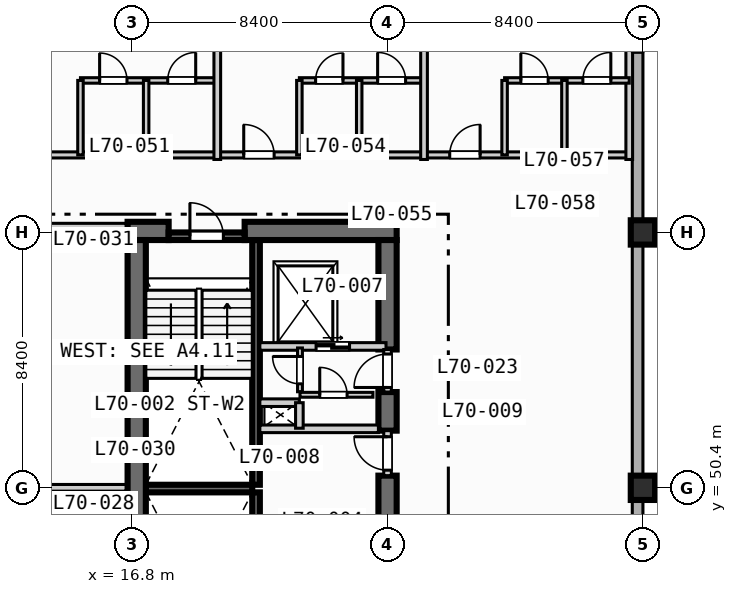
"""IFC4 building model, lengths in metres.
Left out: names, types, materials, properties, quantities, classifications, styles, units other than length and angle.
Written with IfcOpenShell. Run it as: python <this file> out.ifc"""

import sys

from ifc_helpers import new_model, si_unit, direction, frame, frame_2d, origin, origin_2d, place, context, subcontext, project, spatial, rectangle, extrude, element, fill, save


model = new_model("IFC4")
c1 = context("Model", 3, precision=1e-05, world=origin(), true_north=direction((0.0, 1.0)))
c2 = subcontext(c1, "Body", "Model", "MODEL_VIEW")
j1 = project(units=[si_unit("LENGTHUNIT", "METRE"), si_unit("PLANEANGLEUNIT", "RADIAN")], contexts=[c1])
p1 = place(None, origin())
s1 = spatial("IfcSite", under=j1, at=p1, CompositionType="ELEMENT")
p2 = place(p1, origin())
s2 = spatial("IfcBuilding", under=s1, at=p2, CompositionType="ELEMENT")
p3 = place(p2, frame((0.0, 0.0, 282.3)))
s3 = spatial("IfcBuildingStorey", under=s2, at=p3, CompositionType="ELEMENT", Elevation=282.3)
for number, where, z_axis, x_axis in (
    (1, (20.875, 42.2, 0.0), (0.0, 0.0, 1.0), (0.0, 1.0, 0.0)),
    (2, (20.875, 50.5, 0.0), (0.0, 0.0, 1.0), (0.0, 1.0, 0.0)),
):
    element("IfcWall", number, at=place(p3, frame(where, z_axis=z_axis, x_axis=x_axis)), inside=s3, PredefinedType="SOLIDWALL", context=c2, shape_type="SweptSolid", body=[
        extrude(rectangle(XDim=8.05, YDim=0.25, at=frame_2d((4.025, 0.0))), origin(), (0.0, 0.0, 1.0), 3.47),
    ])
p4 = place(p3, frame((17.25, 50.375, 0.0), z_axis=(0.0, 0.0, 1.0), x_axis=(1.0, 0.0, 0.0)))
e3 = element("IfcWall", 3, at=p4, inside=s3, PredefinedType="SOLIDWALL", context=c2, shape_type="SweptSolid", body=[
    extrude(rectangle(XDim=3.5, YDim=0.25, at=frame_2d((1.75, 0.0))), origin(), (0.0, 0.0, 1.0), 3.47),
])
p5 = place(p3, frame((16.65, 58.85, 0.0), z_axis=(0.0, 0.0, 1.0), x_axis=(1.0, 0.0, 0.0)))
e4 = element("IfcWall", 4, at=p5, inside=s3, PredefinedType="SHEAR", context=c2, shape_type="SweptSolid", body=[
    extrude(rectangle(XDim=1.35, YDim=0.6, at=frame_2d((0.675, 0.0))), origin(), (0.0, 0.0, 1.0), 3.47),
])
p6 = place(p3, frame((20.5, 58.85, 0.0), z_axis=(0.0, 0.0, 1.0), x_axis=(1.0, 0.0, 0.0)))
e5 = element("IfcWall", 5, at=p6, inside=s3, PredefinedType="SHEAR", context=c2, shape_type="SweptSolid", body=[
    extrude(rectangle(XDim=5.0, YDim=0.6, at=frame_2d((2.5, 0.0))), origin(), (0.0, 0.0, 1.0), 3.47),
])
p7 = place(p3, frame((16.95, 42.2, 0.0), z_axis=(0.0, 0.0, 1.0), x_axis=(0.0, 1.0, 0.0)))
e6 = element("IfcWall", 6, at=p7, inside=s3, PredefinedType="SHEAR", context=c2, shape_type="SweptSolid", body=[
    extrude(rectangle(XDim=16.35, YDim=0.6, at=frame_2d((8.175, 0.0))), origin(), (0.0, 0.0, 1.0), 3.47),
])
p8 = place(p3, frame((25.2, 42.2, 0.0), z_axis=(0.0, 0.0, 1.0), x_axis=(0.0, 1.0, 0.0)))
e7 = element("IfcWall", 7, at=p8, inside=s3, PredefinedType="SHEAR", context=c2, shape_type="SweptSolid", body=[
    extrude(rectangle(XDim=8.6, YDim=0.6, at=frame_2d((4.3, 0.0))), origin(), (0.0, 0.0, 1.0), 3.47),
])
p9 = place(p3, frame((25.2, 52.28, 0.0), z_axis=(0.0, 0.0, 1.0), x_axis=(0.0, 1.0, 0.0)))
e8 = element("IfcWall", 8, at=p9, inside=s3, PredefinedType="SHEAR", context=c2, shape_type="SweptSolid", body=[
    extrude(rectangle(XDim=1.27, YDim=0.6, at=frame_2d((0.635, 0.0))), origin(), (0.0, 0.0, 1.0), 3.47),
])
p10 = place(p3, frame((25.2, 54.95, 0.0), z_axis=(0.0, 0.0, 1.0), x_axis=(0.0, 1.0, 0.0)))
e9 = element("IfcWall", 9, at=p10, inside=s3, PredefinedType="SHEAR", context=c2, shape_type="SweptSolid", body=[
    extrude(rectangle(XDim=3.6, YDim=0.6, at=frame_2d((1.8, 0.0))), origin(), (0.0, 0.0, 1.0), 3.47),
])
for number, where, z_axis, x_axis in (
    (10, (33.6, 50.4, 0.0), (0.0, 0.0, 1.0), (1.0, 0.0, 0.0)),
    (11, (33.6, 58.8, 0.0), (0.0, 0.0, 1.0), (1.0, 0.0, 0.0)),
):
    element("IfcColumn", number, at=place(p3, frame(where, z_axis=z_axis, x_axis=x_axis)), inside=s3, PredefinedType="COLUMN", context=c2, shape_type="SweptSolid", body=[
        extrude(rectangle(XDim=0.8, YDim=0.8, at=origin_2d()), origin(), (0.0, 0.0, 1.0), 3.7),
    ])
p11 = place(p3, frame((33.425, 72.425, 0.0), z_axis=(0.0, 0.0, 1.0), x_axis=(0.0, -1.0, 0.0)))
e12 = element("IfcWall", 12, at=p11, inside=s3, PredefinedType="STANDARD", context=c2, shape_type="SweptSolid", body=[
    extrude(rectangle(XDim=39.0, YDim=0.35, at=frame_2d((19.5, 0.0))), origin(), (0.0, 0.0, 1.0), 3.47),
])
p12 = place(p11, frame((5.9, 0.0, 0.85)))
e13 = element("IfcOpeningElement", 13, at=p12, cuts=e12, PredefinedType="OPENING", context=c2, shape_type="SweptSolid", body=[
    extrude(rectangle(XDim=1.8, YDim=1.8, at=frame_2d((0.9, 0.9))), frame((0.0, 0.185, 0.0), z_axis=(0.0, -1.0, 0.0), x_axis=(1.0, 0.0, 0.0)), (0.0, 0.0, 1.0), 0.37),
])
p13 = place(p3, frame((18.0, 58.675, 0.0), z_axis=(0.0, 0.0, 1.0), x_axis=(1.0, 0.0, 0.0)))
e14 = element("IfcWall", 14, at=p13, inside=s3, PredefinedType="SOLIDWALL", context=c2, shape_type="SweptSolid", body=[
    extrude(rectangle(XDim=2.5, YDim=0.25, at=frame_2d((1.25, 0.0))), origin(), (0.0, 0.0, 1.0), 3.47),
])
p14 = place(p13, frame((0.7, 0.0, 0.0)))
e15 = element("IfcOpeningElement", 15, at=p14, cuts=e14, PredefinedType="OPENING", context=c2, shape_type="SweptSolid", body=[
    extrude(rectangle(XDim=1.1, YDim=2.15, at=frame_2d((0.55, 1.075))), frame((0.0, 0.135, 0.0), z_axis=(0.0, -1.0, 0.0), x_axis=(1.0, 0.0, 0.0)), (0.0, 0.0, 1.0), 0.27),
])
p15 = place(p3, frame((25.2, 50.8, 0.0), z_axis=(0.0, 0.0, 1.0), x_axis=(0.0, 1.0, 0.0)))
e16 = element("IfcWall", 16, at=p15, inside=s3, PredefinedType="SOLIDWALL", context=c2, shape_type="SweptSolid", body=[
    extrude(rectangle(XDim=1.48, YDim=0.25, at=frame_2d((0.74, 0.0))), origin(), (0.0, 0.0, 1.0), 3.47),
])
p16 = place(p15, frame((0.18, 0.0, 0.0)))
e17 = element("IfcOpeningElement", 17, at=p16, cuts=e16, PredefinedType="OPENING", context=c2, shape_type="SweptSolid", body=[
    extrude(rectangle(XDim=1.1, YDim=2.15, at=frame_2d((0.55, 1.075))), frame((0.0, 0.135, 0.0), z_axis=(0.0, -1.0, 0.0), x_axis=(1.0, 0.0, 0.0)), (0.0, 0.0, 1.0), 0.27),
])
p17 = place(p3, frame((21.0, 52.34, 0.0), z_axis=(0.0, 0.0, 1.0), x_axis=(1.0, 0.0, 0.0)))
e18 = element("IfcWall", 18, at=p17, inside=s3, PredefinedType="SOLIDWALL", context=c2, shape_type="SweptSolid", body=[
    extrude(rectangle(XDim=3.9, YDim=0.25, at=frame_2d((1.95, 0.0))), origin(), (0.0, 0.0, 1.0), 3.47),
])
p18 = place(p3, frame((21.0, 55.05, 0.0), z_axis=(0.0, 0.0, 1.0), x_axis=(1.0, 0.0, 0.0)))
e19 = element("IfcWall", 19, at=p18, inside=s3, PredefinedType="SOLIDWALL", context=c2, shape_type="SweptSolid", body=[
    extrude(rectangle(XDim=4.15, YDim=0.25, at=frame_2d((2.075, 0.0))), origin(), (0.0, 0.0, 1.0), 3.47),
])
p19 = place(p18, frame((1.85, 0.0, 0.0)))
e20 = element("IfcOpeningElement", 20, at=p19, cuts=e19, PredefinedType="OPENING", context=c2, shape_type="SweptSolid", body=[
    extrude(rectangle(XDim=1.1, YDim=2.15, at=frame_2d((0.55, 1.075))), frame((0.0, 0.135, 0.0), z_axis=(0.0, -1.0, 0.0), x_axis=(1.0, 0.0, 0.0)), (0.0, 0.0, 1.0), 0.27),
])
p20 = place(p3, frame((25.2, 53.55, 0.0), z_axis=(0.0, 0.0, 1.0), x_axis=(0.0, 1.0, 0.0)))
e21 = element("IfcWall", 21, at=p20, inside=s3, PredefinedType="SOLIDWALL", context=c2, shape_type="SweptSolid", body=[
    extrude(rectangle(XDim=1.4, YDim=0.25, at=frame_2d((0.7, 0.0))), origin(), (0.0, 0.0, 1.0), 3.47),
])
p21 = place(p20, frame((0.15, 0.0, 0.0)))
e22 = element("IfcOpeningElement", 22, at=p21, cuts=e21, PredefinedType="OPENING", context=c2, shape_type="SweptSolid", body=[
    extrude(rectangle(XDim=1.1, YDim=2.15, at=frame_2d((0.55, 1.075))), frame((0.0, 0.135, 0.0), z_axis=(0.0, -1.0, 0.0), x_axis=(1.0, 0.0, 0.0)), (0.0, 0.0, 1.0), 0.27),
])
p22 = place(p3, frame((21.0, 53.2, 0.0), z_axis=(0.0, 0.0, 1.0), x_axis=(1.0, 0.0, 0.0)))
e23 = element("IfcWall", 23, at=p22, inside=s3, PredefinedType="SOLIDWALL", context=c2, shape_type="SweptSolid", body=[
    extrude(rectangle(XDim=1.3, YDim=0.25, at=frame_2d((0.65, 0.0))), origin(), (0.0, 0.0, 1.0), 3.47),
])
p23 = place(p3, frame((22.3, 52.36, 0.0), z_axis=(0.0, 0.0, 1.0), x_axis=(0.0, 1.0, 0.0)))
e24 = element("IfcWall", 24, at=p23, inside=s3, PredefinedType="SOLIDWALL", context=c2, shape_type="SweptSolid", body=[
    extrude(rectangle(XDim=0.84, YDim=0.25, at=frame_2d((0.42, 0.0))), origin(), (0.0, 0.0, 1.0), 3.47),
])
p24 = place(p3, frame((22.32, 53.56, 0.0), z_axis=(0.0, 0.0, 1.0), x_axis=(0.0, 1.0, 0.0)))
e25 = element("IfcWall", 25, at=p24, inside=s3, PredefinedType="PARTITIONING", context=c2, shape_type="SweptSolid", body=[
    extrude(rectangle(XDim=1.44, YDim=0.16, at=frame_2d((0.72, 0.0))), origin(), (0.0, 0.0, 1.0), 3.47),
])
p25 = place(p24, frame((0.26, 0.0, 0.0)))
e26 = element("IfcOpeningElement", 26, at=p25, cuts=e25, PredefinedType="OPENING", context=c2, shape_type="SweptSolid", body=[
    extrude(rectangle(XDim=0.9, YDim=2.1, at=frame_2d((0.45, 1.05))), frame((0.0, 0.09, 0.0), z_axis=(0.0, -1.0, 0.0), x_axis=(1.0, 0.0, 0.0)), (0.0, 0.0, 1.0), 0.18),
])
p26 = place(p3, frame((22.32, 53.46, 0.0), z_axis=(0.0, 0.0, 1.0), x_axis=(1.0, 0.0, 0.0)))
e27 = element("IfcWall", 27, at=p26, inside=s3, PredefinedType="PARTITIONING", context=c2, shape_type="SweptSolid", body=[
    extrude(rectangle(XDim=2.4, YDim=0.16, at=frame_2d((1.2, 0.0))), origin(), (0.0, 0.0, 1.0), 3.47),
])
p27 = place(p26, frame((0.65, 0.0, 0.0)))
e28 = element("IfcOpeningElement", 28, at=p27, cuts=e27, PredefinedType="OPENING", context=c2, shape_type="SweptSolid", body=[
    extrude(rectangle(XDim=0.9, YDim=2.1, at=frame_2d((0.45, 1.05))), frame((0.0, 0.09, 0.0), z_axis=(0.0, -1.0, 0.0), x_axis=(1.0, 0.0, 0.0)), (0.0, 0.0, 1.0), 0.18),
])
p28 = place(p3, frame((8.65, 59.0, 0.0), z_axis=(0.0, 0.0, 1.0), x_axis=(1.0, 0.0, 0.0)))
e29 = element("IfcWall", 29, at=p28, inside=s3, PredefinedType="PARTITIONING", context=c2, shape_type="SweptSolid", body=[
    extrude(rectangle(XDim=7.95, YDim=0.2, at=frame_2d((3.975, 0.0))), origin(), (0.0, 0.0, 1.0), 2.87),
])
p29 = place(p28, frame((2.0, 0.0, 0.0)))
e30 = element("IfcOpeningElement", 30, at=p29, cuts=e29, PredefinedType="OPENING", context=c2, shape_type="SweptSolid", body=[
    extrude(rectangle(XDim=1.0, YDim=2.15, at=frame_2d((0.5, 1.075))), frame((0.0, 0.11, 0.0), z_axis=(0.0, -1.0, 0.0), x_axis=(1.0, 0.0, 0.0)), (0.0, 0.0, 1.0), 0.22),
])
p30 = place(p3, frame((8.65, 50.4, 0.0), z_axis=(0.0, 0.0, 1.0), x_axis=(1.0, 0.0, 0.0)))
e31 = element("IfcWall", 31, at=p30, inside=s3, PredefinedType="PARTITIONING", context=c2, shape_type="SweptSolid", body=[
    extrude(rectangle(XDim=7.95, YDim=0.22, at=frame_2d((3.975, 0.0))), origin(), (0.0, 0.0, 1.0), 3.16),
])
p31 = place(p3, frame((13.8, 54.7, 0.0), z_axis=(0.0, 0.0, 1.0), x_axis=(1.0, 0.0, 0.0)))
e32 = element("IfcWall", 32, at=p31, inside=s3, PredefinedType="PLUMBINGWALL", context=c2, shape_type="SweptSolid", body=[
    extrude(rectangle(XDim=2.8, YDim=0.18, at=frame_2d((1.4, 0.0))), origin(), (0.0, 0.0, 1.0), 3.47),
])
p32 = place(p3, frame((11.8, 61.35, 0.0), z_axis=(0.0, 0.0, 1.0), x_axis=(1.0, 0.0, 0.0)))
e33 = element("IfcWall", 33, at=p32, inside=s3, PredefinedType="PARTITIONING", context=c2, shape_type="SweptSolid", body=[
    extrude(rectangle(XDim=21.35, YDim=0.2, at=frame_2d((10.675, 0.0))), origin(), (0.0, 0.0, 1.0), 3.47),
])
p33 = place(p32, frame((1.17, 0.0, 0.0)))
e34 = element("IfcOpeningElement", 34, at=p33, cuts=e33, PredefinedType="OPENING", context=c2, shape_type="SweptSolid", body=[
    extrude(rectangle(XDim=1.0, YDim=2.15, at=frame_2d((0.5, 1.075))), frame((0.0, 0.11, 0.0), z_axis=(0.0, -1.0, 0.0), x_axis=(1.0, 0.0, 0.0)), (0.0, 0.0, 1.0), 0.22),
])
p34 = place(p32, frame((8.67, 0.0, 0.0)))
e35 = element("IfcOpeningElement", 35, at=p34, cuts=e33, PredefinedType="OPENING", context=c2, shape_type="SweptSolid", body=[
    extrude(rectangle(XDim=1.0, YDim=2.15, at=frame_2d((0.5, 1.075))), frame((0.0, 0.11, 0.0), z_axis=(0.0, -1.0, 0.0), x_axis=(1.0, 0.0, 0.0)), (0.0, 0.0, 1.0), 0.22),
])
p35 = place(p32, frame((15.445, 0.0, 0.0)))
e36 = element("IfcOpeningElement", 36, at=p35, cuts=e33, PredefinedType="OPENING", context=c2, shape_type="SweptSolid", body=[
    extrude(rectangle(XDim=1.0, YDim=2.15, at=frame_2d((0.5, 1.075))), frame((0.0, 0.11, 0.0), z_axis=(0.0, -1.0, 0.0), x_axis=(1.0, 0.0, 0.0)), (0.0, 0.0, 1.0), 0.22),
])
p36 = place(p3, frame((15.1, 63.8, 0.0), z_axis=(0.0, 0.0, 1.0), x_axis=(1.0, 0.0, 0.0)))
e37 = element("IfcWall", 37, at=p36, inside=s3, PredefinedType="PLUMBINGWALL", context=c2, shape_type="SweptSolid", body=[
    extrude(rectangle(XDim=4.5, YDim=0.18, at=frame_2d((2.25, 0.0))), origin(), (0.0, 0.0, 1.0), 3.47),
])
p37 = place(p36, frame((0.63, 0.0, 0.0)))
e38 = element("IfcOpeningElement", 38, at=p37, cuts=e37, PredefinedType="OPENING", context=c2, shape_type="SweptSolid", body=[
    extrude(rectangle(XDim=0.9, YDim=2.1, at=frame_2d((0.45, 1.05))), frame((0.0, 0.1, 0.0), z_axis=(0.0, -1.0, 0.0), x_axis=(1.0, 0.0, 0.0)), (0.0, 0.0, 1.0), 0.2),
])
p38 = place(p36, frame((2.87, 0.0, 0.0)))
e39 = element("IfcOpeningElement", 39, at=p38, cuts=e37, PredefinedType="OPENING", context=c2, shape_type="SweptSolid", body=[
    extrude(rectangle(XDim=0.92, YDim=2.1, at=frame_2d((0.46, 1.05))), frame((0.0, 0.1, 0.0), z_axis=(0.0, -1.0, 0.0), x_axis=(1.0, 0.0, 0.0)), (0.0, 0.0, 1.0), 0.2),
])
for number, where, z_axis, x_axis in (
    (40, (15.1, 61.35, 0.0), (0.0, 0.0, 1.0), (0.0, 1.0, 0.0)),
    (41, (17.26, 61.35, 0.0), (0.0, 0.0, 1.0), (0.0, 1.0, 0.0)),
):
    element("IfcWall", number, at=place(p3, frame(where, z_axis=z_axis, x_axis=x_axis)), inside=s3, PredefinedType="PLUMBINGWALL", context=c2, shape_type="SweptSolid", body=[
        extrude(rectangle(XDim=2.45, YDim=0.18, at=frame_2d((1.225, 0.0))), origin(), (0.0, 0.0, 1.0), 3.47),
    ])
p39 = place(p3, frame((19.6, 61.2, 0.0), z_axis=(0.0, 0.0, 1.0), x_axis=(0.0, 1.0, 0.0)))
e42 = element("IfcWall", 42, at=p39, inside=s3, PredefinedType="PARTITIONING", context=c2, shape_type="SweptSolid", body=[
    extrude(rectangle(XDim=11.38, YDim=0.22, at=frame_2d((5.69, 0.0))), origin(), (0.0, 0.0, 1.0), 3.47),
])
p40 = place(p3, frame((22.3, 63.8, 0.0), z_axis=(0.0, 0.0, 1.0), x_axis=(1.0, 0.0, 0.0)))
e43 = element("IfcWall", 43, at=p40, inside=s3, PredefinedType="PLUMBINGWALL", context=c2, shape_type="SweptSolid", body=[
    extrude(rectangle(XDim=4.1, YDim=0.18, at=frame_2d((2.05, 0.0))), origin(), (0.0, 0.0, 1.0), 3.47),
])
p41 = place(p40, frame((0.534, 0.0, 0.0)))
e44 = element("IfcOpeningElement", 44, at=p41, cuts=e43, PredefinedType="OPENING", context=c2, shape_type="SweptSolid", body=[
    extrude(rectangle(XDim=0.9, YDim=2.1, at=frame_2d((0.45, 1.05))), frame((0.0, 0.1, 0.0), z_axis=(0.0, -1.0, 0.0), x_axis=(1.0, 0.0, 0.0)), (0.0, 0.0, 1.0), 0.2),
])
p42 = place(p40, frame((2.574, 0.0, 0.0)))
e45 = element("IfcOpeningElement", 45, at=p42, cuts=e43, PredefinedType="OPENING", context=c2, shape_type="SweptSolid", body=[
    extrude(rectangle(XDim=0.92, YDim=2.1, at=frame_2d((0.46, 1.05))), frame((0.0, 0.1, 0.0), z_axis=(0.0, -1.0, 0.0), x_axis=(1.0, 0.0, 0.0)), (0.0, 0.0, 1.0), 0.2),
])
for number, where, z_axis, x_axis in (
    (46, (22.3, 61.35, 0.0), (0.0, 0.0, 1.0), (0.0, 1.0, 0.0)),
    (47, (24.268, 61.35, 0.0), (0.0, 0.0, 1.0), (0.0, 1.0, 0.0)),
):
    element("IfcWall", number, at=place(p3, frame(where, z_axis=z_axis, x_axis=x_axis)), inside=s3, PredefinedType="PLUMBINGWALL", context=c2, shape_type="SweptSolid", body=[
        extrude(rectangle(XDim=2.45, YDim=0.18, at=frame_2d((1.225, 0.0))), origin(), (0.0, 0.0, 1.0), 3.47),
    ])
for number, where, z_axis, x_axis in (
    (48, (26.4, 61.2, 0.0), (0.0, 0.0, 1.0), (0.0, 1.0, 0.0)),
    (49, (33.15, 61.2, 0.0), (0.0, 0.0, 1.0), (0.0, 1.0, 0.0)),
):
    element("IfcWall", number, at=place(p3, frame(where, z_axis=z_axis, x_axis=x_axis)), inside=s3, PredefinedType="PARTITIONING", context=c2, shape_type="SweptSolid", body=[
        extrude(rectangle(XDim=11.38, YDim=0.22, at=frame_2d((5.69, 0.0))), origin(), (0.0, 0.0, 1.0), 3.47),
    ])
p43 = place(p3, frame((29.05, 63.8, 0.0), z_axis=(0.0, 0.0, 1.0), x_axis=(1.0, 0.0, 0.0)))
e50 = element("IfcWall", 50, at=p43, inside=s3, PredefinedType="PLUMBINGWALL", context=c2, shape_type="SweptSolid", body=[
    extrude(rectangle(XDim=4.1, YDim=0.18, at=frame_2d((2.05, 0.0))), origin(), (0.0, 0.0, 1.0), 3.47),
])
p44 = place(p43, frame((0.534, 0.0, 0.0)))
e51 = element("IfcOpeningElement", 51, at=p44, cuts=e50, PredefinedType="OPENING", context=c2, shape_type="SweptSolid", body=[
    extrude(rectangle(XDim=0.9, YDim=2.1, at=frame_2d((0.45, 1.05))), frame((0.0, 0.1, 0.0), z_axis=(0.0, -1.0, 0.0), x_axis=(1.0, 0.0, 0.0)), (0.0, 0.0, 1.0), 0.2),
])
p45 = place(p43, frame((2.574, 0.0, 0.0)))
e52 = element("IfcOpeningElement", 52, at=p45, cuts=e50, PredefinedType="OPENING", context=c2, shape_type="SweptSolid", body=[
    extrude(rectangle(XDim=0.92, YDim=2.1, at=frame_2d((0.46, 1.05))), frame((0.0, 0.1, 0.0), z_axis=(0.0, -1.0, 0.0), x_axis=(1.0, 0.0, 0.0)), (0.0, 0.0, 1.0), 0.2),
])
for number, where, z_axis, x_axis in (
    (53, (29.05, 61.35, 0.0), (0.0, 0.0, 1.0), (0.0, 1.0, 0.0)),
    (54, (31.018, 61.35, 0.0), (0.0, 0.0, 1.0), (0.0, 1.0, 0.0)),
):
    element("IfcWall", number, at=place(p3, frame(where, z_axis=z_axis, x_axis=x_axis)), inside=s3, PredefinedType="PLUMBINGWALL", context=c2, shape_type="SweptSolid", body=[
        extrude(rectangle(XDim=2.45, YDim=0.18, at=frame_2d((1.225, 0.0))), origin(), (0.0, 0.0, 1.0), 3.47),
    ])
p46 = place(p14, origin())
e55 = element("IfcDoor", 55, at=p46, inside=s3, OperationType="SINGLE_SWING_LEFT", PredefinedType="DOOR", context=c2, shape_type="SweptSolid", body=[
    extrude(rectangle(XDim=1.1, YDim=2.15, at=frame_2d((0.55, 1.075))), frame((0.0, 0.025, 0.0), z_axis=(0.0, -1.0, 0.0), x_axis=(1.0, 0.0, 0.0)), (0.0, 0.0, 1.0), 0.05),
])
fill(e15, e55)
p47 = place(p16, origin())
e56 = element("IfcDoor", 56, at=p47, inside=s3, OperationType="SINGLE_SWING_RIGHT", PredefinedType="DOOR", context=c2, shape_type="SweptSolid", body=[
    extrude(rectangle(XDim=1.1, YDim=2.15, at=frame_2d((0.55, 1.075))), frame((0.0, 0.025, 0.0), z_axis=(0.0, -1.0, 0.0), x_axis=(1.0, 0.0, 0.0)), (0.0, 0.0, 1.0), 0.05),
])
fill(e17, e56)
p48 = place(p19, origin())
e57 = element("IfcDoor", 57, at=p48, inside=s3, OperationType="SLIDING_TO_LEFT", PredefinedType="DOOR", context=c2, shape_type="SweptSolid", body=[
    extrude(rectangle(XDim=1.1, YDim=2.15, at=frame_2d((0.55, 1.075))), frame((0.0, 0.025, 0.0), z_axis=(0.0, -1.0, 0.0), x_axis=(1.0, 0.0, 0.0)), (0.0, 0.0, 1.0), 0.05),
])
fill(e20, e57)
p49 = place(p21, origin())
e58 = element("IfcDoor", 58, at=p49, inside=s3, OperationType="SINGLE_SWING_LEFT", PredefinedType="DOOR", context=c2, shape_type="SweptSolid", body=[
    extrude(rectangle(XDim=1.1, YDim=2.15, at=frame_2d((0.55, 1.075))), frame((0.0, 0.025, 0.0), z_axis=(0.0, -1.0, 0.0), x_axis=(1.0, 0.0, 0.0)), (0.0, 0.0, 1.0), 0.05),
])
fill(e22, e58)
p50 = place(p25, origin())
e59 = element("IfcDoor", 59, at=p50, inside=s3, OperationType="SINGLE_SWING_RIGHT", PredefinedType="DOOR", context=c2, shape_type="SweptSolid", body=[
    extrude(rectangle(XDim=0.9, YDim=2.1, at=frame_2d((0.45, 1.05))), frame((0.0, 0.025, 0.0), z_axis=(0.0, -1.0, 0.0), x_axis=(1.0, 0.0, 0.0)), (0.0, 0.0, 1.0), 0.05),
])
fill(e26, e59)
p51 = place(p27, origin())
e60 = element("IfcDoor", 60, at=p51, inside=s3, OperationType="SINGLE_SWING_LEFT", PredefinedType="DOOR", context=c2, shape_type="SweptSolid", body=[
    extrude(rectangle(XDim=0.9, YDim=2.1, at=frame_2d((0.45, 1.05))), frame((0.0, 0.025, 0.0), z_axis=(0.0, -1.0, 0.0), x_axis=(1.0, 0.0, 0.0)), (0.0, 0.0, 1.0), 0.05),
])
fill(e28, e60)
p52 = place(p34, origin())
e61 = element("IfcDoor", 61, at=p52, inside=s3, OperationType="SINGLE_SWING_LEFT", PredefinedType="DOOR", context=c2, shape_type="SweptSolid", body=[
    extrude(rectangle(XDim=1.0, YDim=2.15, at=frame_2d((0.5, 1.075))), frame((0.0, 0.025, 0.0), z_axis=(0.0, -1.0, 0.0), x_axis=(1.0, 0.0, 0.0)), (0.0, 0.0, 1.0), 0.05),
])
fill(e35, e61)
p53 = place(p35, origin())
e62 = element("IfcDoor", 62, at=p53, inside=s3, OperationType="SINGLE_SWING_RIGHT", PredefinedType="DOOR", context=c2, shape_type="SweptSolid", body=[
    extrude(rectangle(XDim=1.0, YDim=2.15, at=frame_2d((0.5, 1.075))), frame((0.0, 0.025, 0.0), z_axis=(0.0, -1.0, 0.0), x_axis=(1.0, 0.0, 0.0)), (0.0, 0.0, 1.0), 0.05),
])
fill(e36, e62)
p54 = place(p37, origin())
e63 = element("IfcDoor", 63, at=p54, inside=s3, OperationType="SINGLE_SWING_LEFT", PredefinedType="DOOR", context=c2, shape_type="SweptSolid", body=[
    extrude(rectangle(XDim=0.9, YDim=2.1, at=frame_2d((0.45, 1.05))), frame((0.0, 0.025, 0.0), z_axis=(0.0, -1.0, 0.0), x_axis=(1.0, 0.0, 0.0)), (0.0, 0.0, 1.0), 0.05),
])
fill(e38, e63)
p55 = place(p38, origin())
e64 = element("IfcDoor", 64, at=p55, inside=s3, OperationType="SINGLE_SWING_RIGHT", PredefinedType="DOOR", context=c2, shape_type="SweptSolid", body=[
    extrude(rectangle(XDim=0.92, YDim=2.1, at=frame_2d((0.46, 1.05))), frame((0.0, 0.025, 0.0), z_axis=(0.0, -1.0, 0.0), x_axis=(1.0, 0.0, 0.0)), (0.0, 0.0, 1.0), 0.05),
])
fill(e39, e64)
p56 = place(p41, origin())
e65 = element("IfcDoor", 65, at=p56, inside=s3, OperationType="SINGLE_SWING_RIGHT", PredefinedType="DOOR", context=c2, shape_type="SweptSolid", body=[
    extrude(rectangle(XDim=0.9, YDim=2.1, at=frame_2d((0.45, 1.05))), frame((0.0, 0.025, 0.0), z_axis=(0.0, -1.0, 0.0), x_axis=(1.0, 0.0, 0.0)), (0.0, 0.0, 1.0), 0.05),
])
fill(e44, e65)
p57 = place(p42, origin())
e66 = element("IfcDoor", 66, at=p57, inside=s3, OperationType="SINGLE_SWING_LEFT", PredefinedType="DOOR", context=c2, shape_type="SweptSolid", body=[
    extrude(rectangle(XDim=0.92, YDim=2.1, at=frame_2d((0.46, 1.05))), frame((0.0, 0.025, 0.0), z_axis=(0.0, -1.0, 0.0), x_axis=(1.0, 0.0, 0.0)), (0.0, 0.0, 1.0), 0.05),
])
fill(e45, e66)
p58 = place(p44, origin())
e67 = element("IfcDoor", 67, at=p58, inside=s3, OperationType="SINGLE_SWING_LEFT", PredefinedType="DOOR", context=c2, shape_type="SweptSolid", body=[
    extrude(rectangle(XDim=0.9, YDim=2.1, at=frame_2d((0.45, 1.05))), frame((0.0, 0.025, 0.0), z_axis=(0.0, -1.0, 0.0), x_axis=(1.0, 0.0, 0.0)), (0.0, 0.0, 1.0), 0.05),
])
fill(e51, e67)
p59 = place(p45, origin())
e68 = element("IfcDoor", 68, at=p59, inside=s3, OperationType="SINGLE_SWING_RIGHT", PredefinedType="DOOR", context=c2, shape_type="SweptSolid", body=[
    extrude(rectangle(XDim=0.92, YDim=2.1, at=frame_2d((0.46, 1.05))), frame((0.0, 0.025, 0.0), z_axis=(0.0, -1.0, 0.0), x_axis=(1.0, 0.0, 0.0)), (0.0, 0.0, 1.0), 0.05),
])
fill(e52, e68)
save(model, sys.argv[1])
